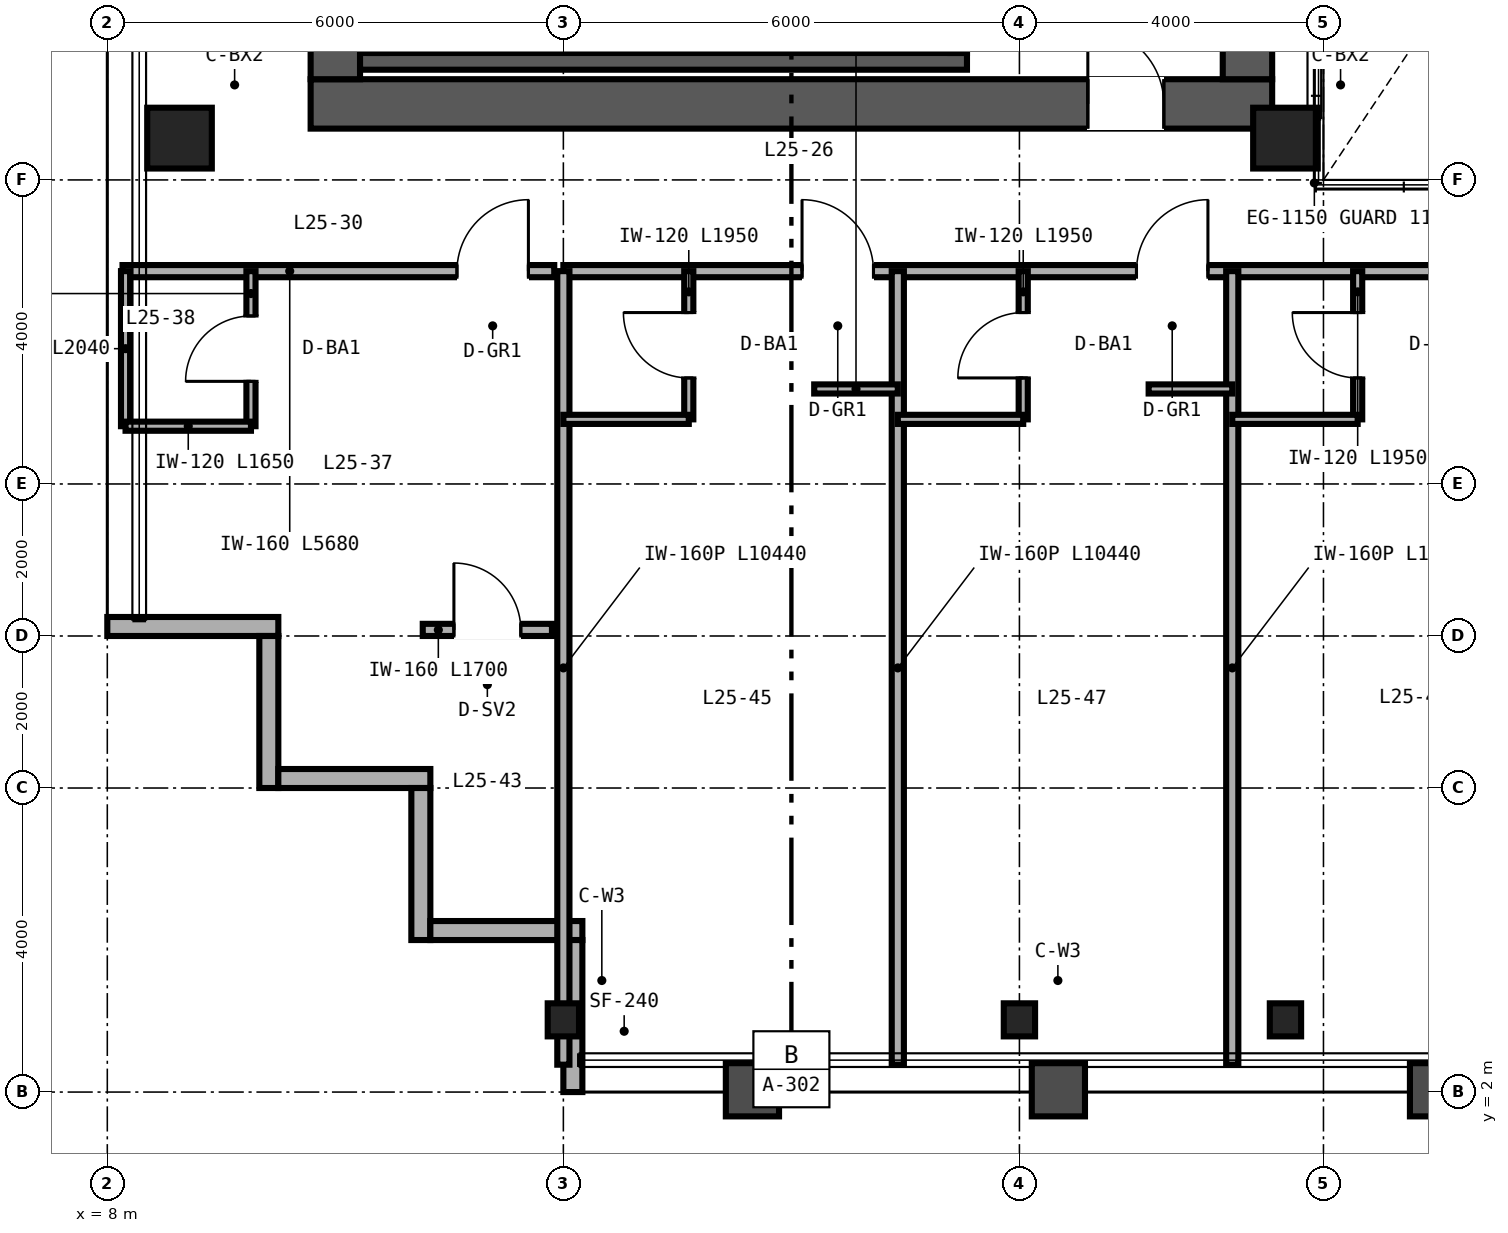
"""IFC4 building model, lengths in metres.
Left out: names, types, materials, properties, quantities, classifications, styles, units other than length and angle.
Written with IfcOpenShell. Run it as: python <this file> out.ifc"""

import sys

from ifc_helpers import new_model, si_unit, direction, frame, frame_2d, origin, origin_2d, place, context, subcontext, project, spatial, rectangle, hollow_rectangle, i_section, extrude, source, transform, mapped, element, fill, save


model = new_model("IFC4")
c1 = context("Model", 3, precision=1e-05, world=origin(), true_north=direction((0.0, 1.0)))
c2 = subcontext(c1, "Body", "Model", "MODEL_VIEW")
j1 = project(units=[si_unit("LENGTHUNIT", "METRE"), si_unit("PLANEANGLEUNIT", "RADIAN")], contexts=[c1])
p1 = place(None, origin())
s1 = spatial("IfcSite", under=j1, at=p1, CompositionType="ELEMENT")
p2 = place(p1, origin())
s2 = spatial("IfcBuilding", under=s1, at=p2, CompositionType="ELEMENT")
p3 = place(p2, frame((0.0, 0.0, 104.4)))
s3 = spatial("IfcBuildingStorey", under=s2, at=p3, CompositionType="ELEMENT", Elevation=104.4)
p4 = place(p3, frame((10.675, 15.0, 0.0), z_axis=(0.0, 0.0, 1.0), x_axis=(1.0, 0.0, 0.0)))
e1 = element("IfcWall", 1, at=p4, inside=s3, PredefinedType="SHEAR", context=c2, shape_type="SweptSolid", body=[
    extrude(rectangle(XDim=12.65, YDim=0.65, at=frame_2d((6.325, 0.0))), origin(), (0.0, 0.0, 1.0), 3.36),
])
p5 = place(p4, frame((10.225, 0.0, 0.0)))
e2 = element("IfcOpeningElement", 2, at=p5, cuts=e1, PredefinedType="OPENING", context=c2, shape_type="SweptSolid", body=[
    extrude(rectangle(XDim=1.0, YDim=2.15, at=frame_2d((0.5, 1.075))), frame((0.0, 0.335, 0.0), z_axis=(0.0, -1.0, 0.0), x_axis=(1.0, 0.0, 0.0)), (0.0, 0.0, 1.0), 0.67),
])
for number, where, z_axis, x_axis in (
    (3, (11.0, 15.325, 0.0), (0.0, 0.0, 1.0), (0.0, 1.0, 0.0)),
    (4, (23.0, 15.325, 0.0), (0.0, 0.0, 1.0), (0.0, 1.0, 0.0)),
):
    element("IfcWall", number, at=place(p3, frame(where, z_axis=z_axis, x_axis=x_axis)), inside=s3, PredefinedType="SHEAR", context=c2, shape_type="SweptSolid", body=[
        extrude(rectangle(XDim=21.35, YDim=0.65, at=frame_2d((10.675, 0.0))), origin(), (0.0, 0.0, 1.0), 3.36),
    ])
p6 = place(p3, frame((11.325, 15.56, 0.0), z_axis=(0.0, 0.0, 1.0), x_axis=(1.0, 0.0, 0.0)))
e5 = element("IfcWall", 5, at=p6, inside=s3, PredefinedType="SHEAR", context=c2, shape_type="SweptSolid", body=[
    extrude(rectangle(XDim=7.985, YDim=0.22, at=frame_2d((3.993, 0.0))), origin(), (0.0, 0.0, 1.0), 3.4),
])
for number, where, z_axis, x_axis in (
    (6, (11.56, 15.67, 0.0), (0.0, 0.0, 1.0), (0.0, 1.0, 0.0)),
    (7, (19.2, 15.67, 0.0), (0.0, 0.0, 1.0), (0.0, 1.0, 0.0)),
):
    element("IfcWall", number, at=place(p3, frame(where, z_axis=z_axis, x_axis=x_axis)), inside=s3, PredefinedType="SHEAR", context=c2, shape_type="SweptSolid", body=[
        extrude(rectangle(XDim=3.28, YDim=0.22, at=frame_2d((1.64, 0.0))), origin(), (0.0, 0.0, 1.0), 3.4),
    ])
m1 = source(origin(), c2, "Body", "SweptSolid", [
    extrude(hollow_rectangle(XDim=0.85, YDim=0.8, WallThickness=0.032, at=origin_2d()), origin(), (0.0, 0.0, 1.0), 3.36),
])
for number, where, z_axis, x_axis in (
    (8, (8.95, 14.55, 0.0), (0.0, 0.0, 1.0), (1.0, 0.0, 0.0)),
    (9, (23.5, 14.55, 0.0), (0.0, 0.0, 1.0), (1.0, 0.0, 0.0)),
):
    element("IfcColumn", number, at=place(p3, frame(where, z_axis=z_axis, x_axis=x_axis)), inside=s3, PredefinedType="COLUMN", context=c2, shape_type="MappedRepresentation", body=[
        mapped(m1, transform((0.0, 0.0, 0.0), scale=1.0)),
    ])
m2 = source(origin(), c2, "Body", "SweptSolid", [
    extrude(i_section(OverallWidth=0.412, OverallDepth=0.435, WebThickness=0.036, FlangeThickness=0.057, FilletRadius=0.025, at=origin_2d()), origin(), (0.0, 0.0, 1.0), 3.36),
])
for number, where, z_axis, x_axis in (
    (10, (14.0, 2.95, 0.0), (0.0, 0.0, 1.0), (1.0, 0.0, 0.0)),
    (11, (20.0, 2.95, 0.0), (0.0, 0.0, 1.0), (1.0, 0.0, 0.0)),
    (12, (23.5, 2.95, 0.0), (0.0, 0.0, 1.0), (1.0, 0.0, 0.0)),
):
    element("IfcColumn", number, at=place(p3, frame(where, z_axis=z_axis, x_axis=x_axis)), inside=s3, PredefinedType="COLUMN", context=c2, shape_type="MappedRepresentation", body=[
        mapped(m2, transform((0.0, 0.0, 0.0), scale=1.0)),
    ])
p7 = place(p3, frame((8.0, 8.125, 0.0), z_axis=(0.0, 0.0, 1.0), x_axis=(1.0, 0.0, 0.0)))
e13 = element("IfcWall", 13, at=p7, inside=s3, PredefinedType="SOLIDWALL", context=c2, shape_type="SweptSolid", body=[
    extrude(rectangle(XDim=2.25, YDim=0.25, at=frame_2d((1.125, 0.0))), origin(), (0.0, 0.0, 1.0), 3.36),
])
for number, where, z_axis, x_axis in (
    (14, (10.125, 8.0, 0.0), (0.0, 0.0, 1.0), (0.0, -1.0, 0.0)),
    (15, (10.25, 6.125, 0.0), (0.0, 0.0, 1.0), (1.0, 0.0, 0.0)),
    (16, (12.125, 6.0, 0.0), (0.0, 0.0, 1.0), (0.0, -1.0, 0.0)),
    (17, (12.25, 4.125, 0.0), (0.0, 0.0, 1.0), (1.0, 0.0, 0.0)),
):
    element("IfcWall", number, at=place(p3, frame(where, z_axis=z_axis, x_axis=x_axis)), inside=s3, PredefinedType="SOLIDWALL", context=c2, shape_type="SweptSolid", body=[
        extrude(rectangle(XDim=2.0, YDim=0.25, at=frame_2d((1.0, 0.0))), origin(), (0.0, 0.0, 1.0), 3.36),
    ])
p8 = place(p3, frame((14.125, 4.0, 0.0), z_axis=(0.0, 0.0, 1.0), x_axis=(0.0, -1.0, 0.0)))
e18 = element("IfcWall", 18, at=p8, inside=s3, PredefinedType="SOLIDWALL", context=c2, shape_type="SweptSolid", body=[
    extrude(rectangle(XDim=2.0, YDim=0.25, at=frame_2d((1.0, 0.0))), origin(), (0.0, 0.0, 1.0), 2.667),
])
p9 = place(p3, frame((8.2, 12.8, 0.0), z_axis=(0.0, 0.0, 1.0), x_axis=(1.0, 0.0, 0.0)))
e19 = element("IfcWall", 19, at=p9, inside=s3, PredefinedType="PARTITIONING", context=c2, shape_type="SweptSolid", body=[
    extrude(rectangle(XDim=5.68, YDim=0.16, at=frame_2d((2.84, 0.0))), origin(), (0.0, 0.0, 1.0), 3.36),
])
p10 = place(p9, frame((4.4, 0.0, 0.0)))
e20 = element("IfcOpeningElement", 20, at=p10, cuts=e19, PredefinedType="OPENING", context=c2, shape_type="SweptSolid", body=[
    extrude(rectangle(XDim=0.94, YDim=2.15, at=frame_2d((0.47, 1.075))), frame((0.0, 0.09, 0.0), z_axis=(0.0, -1.0, 0.0), x_axis=(1.0, 0.0, 0.0)), (0.0, 0.0, 1.0), 0.18),
])
p11 = place(p3, frame((9.89, 10.76, 0.0), z_axis=(0.0, 0.0, 1.0), x_axis=(0.0, 1.0, 0.0)))
e21 = element("IfcWall", 21, at=p11, inside=s3, PredefinedType="PARTITIONING", context=c2, shape_type="SweptSolid", body=[
    extrude(rectangle(XDim=2.04, YDim=0.12, at=frame_2d((1.02, 0.0))), origin(), (0.0, 0.0, 1.0), 3.36),
])
p12 = place(p11, frame((0.59, 0.0, 0.0)))
e22 = element("IfcOpeningElement", 22, at=p12, cuts=e21, PredefinedType="OPENING", context=c2, shape_type="SweptSolid", body=[
    extrude(rectangle(XDim=0.86, YDim=2.1, at=frame_2d((0.43, 1.05))), frame((0.0, 0.07, 0.0), z_axis=(0.0, -1.0, 0.0), x_axis=(1.0, 0.0, 0.0)), (0.0, 0.0, 1.0), 0.14),
])
p13 = place(p3, frame((8.24, 10.76, 0.0), z_axis=(0.0, 0.0, 1.0), x_axis=(0.0, 1.0, 0.0)))
e23 = element("IfcWall", 23, at=p13, inside=s3, PredefinedType="PARTITIONING", context=c2, shape_type="SweptSolid", body=[
    extrude(rectangle(XDim=2.04, YDim=0.12, at=frame_2d((1.02, 0.0))), origin(), (0.0, 0.0, 1.0), 3.36),
])
p14 = place(p3, frame((8.24, 10.76, 0.0), z_axis=(0.0, 0.0, 1.0), x_axis=(1.0, 0.0, 0.0)))
e24 = element("IfcWall", 24, at=p14, inside=s3, PredefinedType="PARTITIONING", context=c2, shape_type="SweptSolid", body=[
    extrude(rectangle(XDim=1.65, YDim=0.12, at=frame_2d((0.825, 0.0))), origin(), (0.0, 0.0, 1.0), 3.36),
])
p15 = place(p3, frame((12.15, 8.08, 0.0), z_axis=(0.0, 0.0, 1.0), x_axis=(1.0, 0.0, 0.0)))
e25 = element("IfcWall", 25, at=p15, inside=s3, PredefinedType="PARTITIONING", context=c2, shape_type="SweptSolid", body=[
    extrude(rectangle(XDim=1.7, YDim=0.16, at=frame_2d((0.85, 0.0))), origin(), (0.0, 0.0, 1.0), 3.36),
])
p16 = place(p15, frame((0.41, 0.0, 0.0)))
e26 = element("IfcOpeningElement", 26, at=p16, cuts=e25, PredefinedType="OPENING", context=c2, shape_type="SweptSolid", body=[
    extrude(rectangle(XDim=0.88, YDim=2.15, at=frame_2d((0.44, 1.075))), frame((0.0, 0.09, 0.0), z_axis=(0.0, -1.0, 0.0), x_axis=(1.0, 0.0, 0.0)), (0.0, 0.0, 1.0), 0.18),
])
p17 = place(p3, frame((14.0, 12.8, 0.0), z_axis=(0.0, 0.0, 1.0), x_axis=(1.0, 0.0, 0.0)))
e27 = element("IfcWall", 27, at=p17, inside=s3, PredefinedType="PARTITIONING", context=c2, shape_type="SweptSolid", body=[
    extrude(rectangle(XDim=36.0, YDim=0.16, at=frame_2d((18.0, 0.0))), origin(), (0.0, 0.0, 1.0), 2.581),
])
p18 = place(p17, frame((3.14, 0.0, 0.0)))
e28 = element("IfcOpeningElement", 28, at=p18, cuts=e27, PredefinedType="OPENING", context=c2, shape_type="SweptSolid", body=[
    extrude(rectangle(XDim=0.94, YDim=2.15, at=frame_2d((0.47, 1.075))), frame((0.0, 0.09, 0.0), z_axis=(0.0, -1.0, 0.0), x_axis=(1.0, 0.0, 0.0)), (0.0, 0.0, 1.0), 0.18),
])
p19 = place(p17, frame((7.54, 0.0, 0.0)))
e29 = element("IfcOpeningElement", 29, at=p19, cuts=e27, PredefinedType="OPENING", context=c2, shape_type="SweptSolid", body=[
    extrude(rectangle(XDim=0.94, YDim=2.15, at=frame_2d((0.47, 1.075))), frame((0.0, 0.09, 0.0), z_axis=(0.0, -1.0, 0.0), x_axis=(1.0, 0.0, 0.0)), (0.0, 0.0, 1.0), 0.18),
])
p20 = place(p17, frame((12.14, 0.0, 0.0)))
e30 = element("IfcOpeningElement", 30, at=p20, cuts=e27, PredefinedType="OPENING", context=c2, shape_type="SweptSolid", body=[
    extrude(rectangle(XDim=0.94, YDim=2.15, at=frame_2d((0.47, 1.075))), frame((0.0, 0.09, 0.0), z_axis=(0.0, -1.0, 0.0), x_axis=(1.0, 0.0, 0.0)), (0.0, 0.0, 1.0), 0.18),
])
p21 = place(p17, frame((16.94, 0.0, 0.0)))
e31 = element("IfcOpeningElement", 31, at=p21, cuts=e27, PredefinedType="OPENING", context=c2, shape_type="SweptSolid", body=[
    extrude(rectangle(XDim=0.94, YDim=2.15, at=frame_2d((0.47, 1.075))), frame((0.0, 0.09, 0.0), z_axis=(0.0, -1.0, 0.0), x_axis=(1.0, 0.0, 0.0)), (0.0, 0.0, 1.0), 0.18),
])
p22 = place(p17, frame((21.74, 0.0, 0.0)))
e32 = element("IfcOpeningElement", 32, at=p22, cuts=e27, PredefinedType="OPENING", context=c2, shape_type="SweptSolid", body=[
    extrude(rectangle(XDim=0.94, YDim=2.15, at=frame_2d((0.47, 1.075))), frame((0.0, 0.09, 0.0), z_axis=(0.0, -1.0, 0.0), x_axis=(1.0, 0.0, 0.0)), (0.0, 0.0, 1.0), 0.18),
])
p23 = place(p17, frame((26.34, 0.0, 0.0)))
e33 = element("IfcOpeningElement", 33, at=p23, cuts=e27, PredefinedType="OPENING", context=c2, shape_type="SweptSolid", body=[
    extrude(rectangle(XDim=0.94, YDim=2.15, at=frame_2d((0.47, 1.075))), frame((0.0, 0.09, 0.0), z_axis=(0.0, -1.0, 0.0), x_axis=(1.0, 0.0, 0.0)), (0.0, 0.0, 1.0), 0.18),
])
p24 = place(p17, frame((30.54, 0.0, 0.0)))
e34 = element("IfcOpeningElement", 34, at=p24, cuts=e27, PredefinedType="OPENING", context=c2, shape_type="SweptSolid", body=[
    extrude(rectangle(XDim=0.94, YDim=2.15, at=frame_2d((0.47, 1.075))), frame((0.0, 0.09, 0.0), z_axis=(0.0, -1.0, 0.0), x_axis=(1.0, 0.0, 0.0)), (0.0, 0.0, 1.0), 0.18),
])
p25 = place(p17, frame((34.74, 0.0, 0.0)))
e35 = element("IfcOpeningElement", 35, at=p25, cuts=e27, PredefinedType="OPENING", context=c2, shape_type="SweptSolid", body=[
    extrude(rectangle(XDim=0.94, YDim=2.15, at=frame_2d((0.47, 1.075))), frame((0.0, 0.09, 0.0), z_axis=(0.0, -1.0, 0.0), x_axis=(1.0, 0.0, 0.0)), (0.0, 0.0, 1.0), 0.18),
])
for number, where, z_axis, x_axis in (
    (36, (14.0, 2.36, 0.0), (0.0, 0.0, 1.0), (0.0, 1.0, 0.0)),
    (37, (18.4, 2.36, 0.0), (0.0, 0.0, 1.0), (0.0, 1.0, 0.0)),
):
    element("IfcWall", number, at=place(p3, frame(where, z_axis=z_axis, x_axis=x_axis)), inside=s3, PredefinedType="PARTITIONING", context=c2, shape_type="SweptSolid", body=[
        extrude(rectangle(XDim=10.44, YDim=0.16, at=frame_2d((5.22, 0.0))), origin(), (0.0, 0.0, 1.0), 2.667),
    ])
p26 = place(p3, frame((15.65, 10.85, 0.0), z_axis=(0.0, 0.0, 1.0), x_axis=(0.0, 1.0, 0.0)))
e38 = element("IfcWall", 38, at=p26, inside=s3, PredefinedType="PARTITIONING", context=c2, shape_type="SweptSolid", body=[
    extrude(rectangle(XDim=1.95, YDim=0.12, at=frame_2d((0.975, 0.0))), origin(), (0.0, 0.0, 1.0), 3.36),
])
p27 = place(p26, frame((0.545, 0.0, 0.0)))
e39 = element("IfcOpeningElement", 39, at=p27, cuts=e38, PredefinedType="OPENING", context=c2, shape_type="SweptSolid", body=[
    extrude(rectangle(XDim=0.86, YDim=2.1, at=frame_2d((0.43, 1.05))), frame((0.0, 0.07, 0.0), z_axis=(0.0, -1.0, 0.0), x_axis=(1.0, 0.0, 0.0)), (0.0, 0.0, 1.0), 0.14),
])
p28 = place(p3, frame((14.0, 10.85, 0.0), z_axis=(0.0, 0.0, 1.0), x_axis=(1.0, 0.0, 0.0)))
e40 = element("IfcWall", 40, at=p28, inside=s3, PredefinedType="PARTITIONING", context=c2, shape_type="SweptSolid", body=[
    extrude(rectangle(XDim=1.65, YDim=0.12, at=frame_2d((0.825, 0.0))), origin(), (0.0, 0.0, 1.0), 3.36),
])
p29 = place(p3, frame((17.3, 11.25, 0.0), z_axis=(0.0, 0.0, 1.0), x_axis=(1.0, 0.0, 0.0)))
e41 = element("IfcWall", 41, at=p29, inside=s3, PredefinedType="PARTITIONING", context=c2, shape_type="SweptSolid", body=[
    extrude(rectangle(XDim=1.1, YDim=0.12, at=frame_2d((0.55, 0.0))), origin(), (0.0, 0.0, 1.0), 3.36),
])
p30 = place(p3, frame((22.8, 2.36, 0.0), z_axis=(0.0, 0.0, 1.0), x_axis=(0.0, 1.0, 0.0)))
e42 = element("IfcWall", 42, at=p30, inside=s3, PredefinedType="PARTITIONING", context=c2, shape_type="SweptSolid", body=[
    extrude(rectangle(XDim=10.44, YDim=0.16, at=frame_2d((5.22, 0.0))), origin(), (0.0, 0.0, 1.0), 2.823),
])
p31 = place(p3, frame((20.05, 10.85, 0.0), z_axis=(0.0, 0.0, 1.0), x_axis=(0.0, 1.0, 0.0)))
e43 = element("IfcWall", 43, at=p31, inside=s3, PredefinedType="PARTITIONING", context=c2, shape_type="SweptSolid", body=[
    extrude(rectangle(XDim=1.95, YDim=0.12, at=frame_2d((0.975, 0.0))), origin(), (0.0, 0.0, 1.0), 3.36),
])
p32 = place(p31, frame((0.545, 0.0, 0.0)))
e44 = element("IfcOpeningElement", 44, at=p32, cuts=e43, PredefinedType="OPENING", context=c2, shape_type="SweptSolid", body=[
    extrude(rectangle(XDim=0.86, YDim=2.1, at=frame_2d((0.43, 1.05))), frame((0.0, 0.07, 0.0), z_axis=(0.0, -1.0, 0.0), x_axis=(1.0, 0.0, 0.0)), (0.0, 0.0, 1.0), 0.14),
])
p33 = place(p3, frame((18.4, 10.85, 0.0), z_axis=(0.0, 0.0, 1.0), x_axis=(1.0, 0.0, 0.0)))
e45 = element("IfcWall", 45, at=p33, inside=s3, PredefinedType="PARTITIONING", context=c2, shape_type="SweptSolid", body=[
    extrude(rectangle(XDim=1.65, YDim=0.12, at=frame_2d((0.825, 0.0))), origin(), (0.0, 0.0, 1.0), 3.36),
])
p34 = place(p3, frame((21.7, 11.25, 0.0), z_axis=(0.0, 0.0, 1.0), x_axis=(1.0, 0.0, 0.0)))
e46 = element("IfcWall", 46, at=p34, inside=s3, PredefinedType="PARTITIONING", context=c2, shape_type="SweptSolid", body=[
    extrude(rectangle(XDim=1.1, YDim=0.12, at=frame_2d((0.55, 0.0))), origin(), (0.0, 0.0, 1.0), 3.36),
])
p35 = place(p3, frame((24.45, 10.85, 0.0), z_axis=(0.0, 0.0, 1.0), x_axis=(0.0, 1.0, 0.0)))
e47 = element("IfcWall", 47, at=p35, inside=s3, PredefinedType="PARTITIONING", context=c2, shape_type="SweptSolid", body=[
    extrude(rectangle(XDim=1.95, YDim=0.12, at=frame_2d((0.975, 0.0))), origin(), (0.0, 0.0, 1.0), 3.36),
])
p36 = place(p35, frame((0.545, 0.0, 0.0)))
e48 = element("IfcOpeningElement", 48, at=p36, cuts=e47, PredefinedType="OPENING", context=c2, shape_type="SweptSolid", body=[
    extrude(rectangle(XDim=0.86, YDim=2.1, at=frame_2d((0.43, 1.05))), frame((0.0, 0.07, 0.0), z_axis=(0.0, -1.0, 0.0), x_axis=(1.0, 0.0, 0.0)), (0.0, 0.0, 1.0), 0.14),
])
p37 = place(p3, frame((22.8, 10.85, 0.0), z_axis=(0.0, 0.0, 1.0), x_axis=(1.0, 0.0, 0.0)))
e49 = element("IfcWall", 49, at=p37, inside=s3, PredefinedType="PARTITIONING", context=c2, shape_type="SweptSolid", body=[
    extrude(rectangle(XDim=1.65, YDim=0.12, at=frame_2d((0.825, 0.0))), origin(), (0.0, 0.0, 1.0), 2.581),
])
m3 = source(origin(), c2, "Body", "SweptSolid", [
    extrude(rectangle(XDim=1.0, YDim=2.15, at=frame_2d((0.5, 1.075))), frame((0.0, 0.025, 0.0), z_axis=(0.0, -1.0, 0.0), x_axis=(1.0, 0.0, 0.0)), (0.0, 0.0, 1.0), 0.05),
])
p38 = place(p5, origin())
e50 = element("IfcDoor", 50, at=p38, inside=s3, OperationType="SINGLE_SWING_LEFT", PredefinedType="DOOR", context=c2, shape_type="MappedRepresentation", body=[
    mapped(m3, transform((0.0, 0.0, 0.0), scale=1.0)),
])
fill(e2, e50)
m4 = source(origin(), c2, "Body", "SweptSolid", [
    extrude(rectangle(XDim=0.86, YDim=2.1, at=frame_2d((0.43, 1.05))), frame((0.0, 0.025, 0.0), z_axis=(0.0, -1.0, 0.0), x_axis=(1.0, 0.0, 0.0)), (0.0, 0.0, 1.0), 0.05),
])
p39 = place(p12, origin())
e51 = element("IfcDoor", 51, at=p39, inside=s3, OperationType="SINGLE_SWING_LEFT", PredefinedType="DOOR", context=c2, shape_type="MappedRepresentation", body=[
    mapped(m4, transform((0.0, 0.0, 0.0), scale=1.0)),
])
fill(e22, e51)
m5 = source(origin(), c2, "Body", "SweptSolid", [
    extrude(rectangle(XDim=0.94, YDim=2.15, at=frame_2d((0.47, 1.075))), frame((0.0, 0.025, 0.0), z_axis=(0.0, -1.0, 0.0), x_axis=(1.0, 0.0, 0.0)), (0.0, 0.0, 1.0), 0.05),
])
p40 = place(p10, origin())
e52 = element("IfcDoor", 52, at=p40, inside=s3, OperationType="SINGLE_SWING_RIGHT", PredefinedType="DOOR", context=c2, shape_type="MappedRepresentation", body=[
    mapped(m5, transform((0.0, 0.0, 0.0), scale=1.0)),
])
fill(e20, e52)
m6 = source(origin(), c2, "Body", "SweptSolid", [
    extrude(rectangle(XDim=0.88, YDim=2.15, at=frame_2d((0.44, 1.075))), frame((0.0, 0.025, 0.0), z_axis=(0.0, -1.0, 0.0), x_axis=(1.0, 0.0, 0.0)), (0.0, 0.0, 1.0), 0.05),
])
p41 = place(p16, origin())
e53 = element("IfcDoor", 53, at=p41, inside=s3, OperationType="SINGLE_SWING_LEFT", PredefinedType="DOOR", context=c2, shape_type="MappedRepresentation", body=[
    mapped(m6, transform((0.0, 0.0, 0.0), scale=1.0)),
])
fill(e26, e53)
p42 = place(p27, origin())
e54 = element("IfcDoor", 54, at=p42, inside=s3, OperationType="SINGLE_SWING_RIGHT", PredefinedType="DOOR", context=c2, shape_type="MappedRepresentation", body=[
    mapped(m4, transform((0.0, 0.0, 0.0), scale=1.0)),
])
fill(e39, e54)
p43 = place(p32, origin())
e55 = element("IfcDoor", 55, at=p43, inside=s3, OperationType="SINGLE_SWING_LEFT", PredefinedType="DOOR", context=c2, shape_type="MappedRepresentation", body=[
    mapped(m4, transform((0.0, 0.0, 0.0), scale=1.0)),
])
fill(e44, e55)
p44 = place(p36, origin())
e56 = element("IfcDoor", 56, at=p44, inside=s3, OperationType="SINGLE_SWING_RIGHT", PredefinedType="DOOR", context=c2, shape_type="MappedRepresentation", body=[
    mapped(m4, transform((0.0, 0.0, 0.0), scale=1.0)),
])
fill(e48, e56)
p45 = place(p18, origin())
e57 = element("IfcDoor", 57, at=p45, inside=s3, OperationType="SINGLE_SWING_LEFT", PredefinedType="DOOR", context=c2, shape_type="MappedRepresentation", body=[
    mapped(m5, transform((0.0, 0.0, 0.0), scale=1.0)),
])
fill(e28, e57)
p46 = place(p19, origin())
e58 = element("IfcDoor", 58, at=p46, inside=s3, OperationType="SINGLE_SWING_RIGHT", PredefinedType="DOOR", context=c2, shape_type="MappedRepresentation", body=[
    mapped(m5, transform((0.0, 0.0, 0.0), scale=1.0)),
])
fill(e29, e58)
save(model, sys.argv[1])
